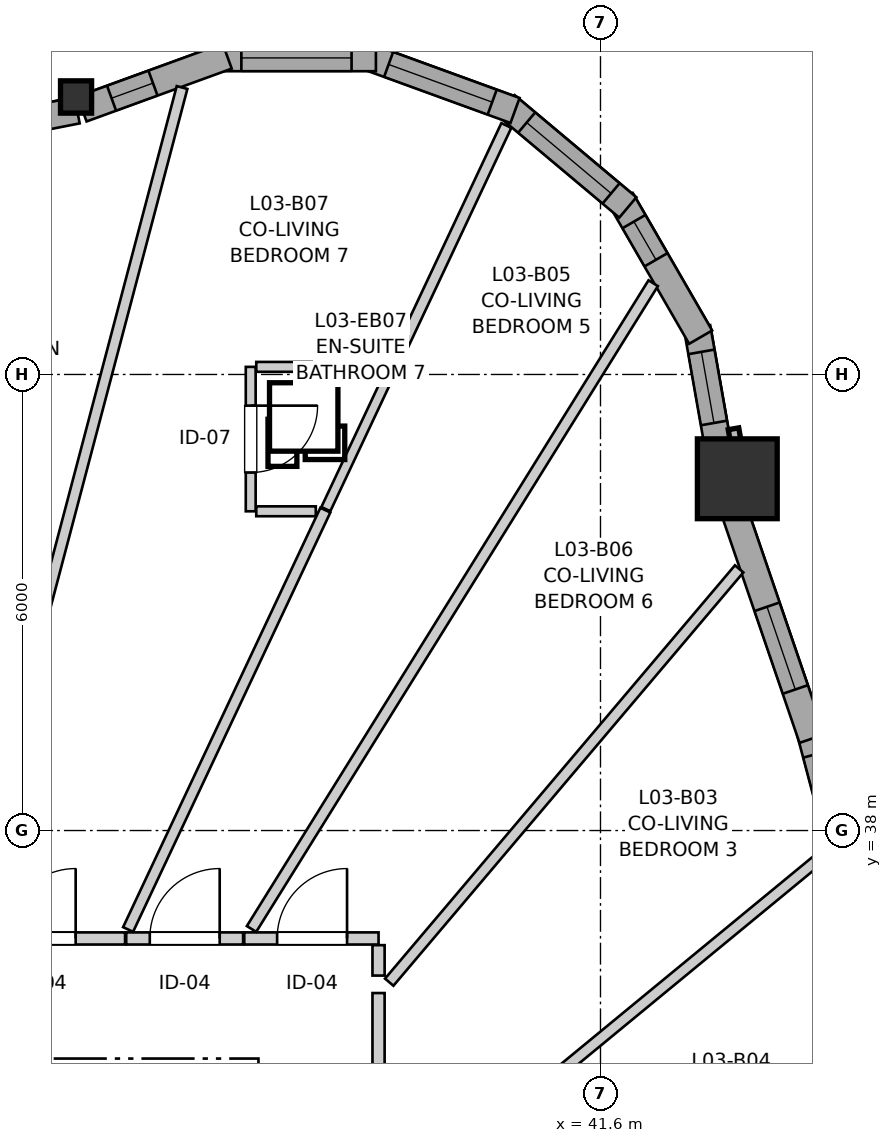
"""IFC4 building model, lengths in metres.
Left out: names, types, materials, properties, quantities, classifications, styles, units other than length and angle.
Written with IfcOpenShell. Run it as: python <this file> out.ifc"""

import sys

from ifc_helpers import new_model, si_unit, direction, frame, frame_2d, origin, origin_2d, place, context, subcontext, project, spatial, rectangle, i_section, extrude, source, transform, mapped, element, fill, save


model = new_model("IFC4")
c1 = context("Model", 3, precision=1e-05, world=origin(), true_north=direction((0.0, 1.0)))
c2 = subcontext(c1, "Body", "Model", "MODEL_VIEW")
j1 = project(units=[si_unit("LENGTHUNIT", "METRE"), si_unit("PLANEANGLEUNIT", "RADIAN")], contexts=[c1])
p1 = place(None, origin())
s1 = spatial("IfcSite", under=j1, at=p1, CompositionType="ELEMENT")
p2 = place(p1, origin())
s2 = spatial("IfcBuilding", under=s1, at=p2, CompositionType="ELEMENT")
p3 = place(p2, frame((0.0, 0.0, 14.2)))
s3 = spatial("IfcBuildingStorey", under=s2, at=p3, CompositionType="ELEMENT", Elevation=14.2)
m1 = source(origin(), c2, "Body", "SweptSolid", [
    extrude(rectangle(XDim=1.05, YDim=1.05, at=origin_2d()), origin(), (0.0, 0.0, 1.0), 2.94),
])
p4 = place(p3, frame((43.4, 42.628, 0.0), z_axis=(0.0, 0.0, 1.0), x_axis=(1.0, 0.0, 0.0)))
e1 = element("IfcColumn", 1, at=p4, inside=s3, PredefinedType="COLUMN", context=c2, shape_type="MappedRepresentation", body=[
    mapped(m1, transform((0.0, 0.0, 0.0), x_axis=(1.0, 0.0, 0.0), y_axis=(0.0, 1.0, 0.0), z_axis=(0.0, 0.0, 1.0), scale=1.0)),
])
m2 = source(origin(), c2, "Body", "SweptSolid", [
    extrude(i_section(OverallWidth=0.409, OverallDepth=0.425, WebThickness=0.03, FlangeThickness=0.048, FilletRadius=0.015, at=origin_2d()), origin(), (0.0, 0.0, 1.0), 2.94),
])
p5 = place(p3, frame((34.7, 47.651, 0.0), z_axis=(0.0, 0.0, 1.0), x_axis=(1.0, 0.0, 0.0)))
e2 = element("IfcColumn", 2, at=p5, inside=s3, PredefinedType="PILASTER", context=c2, shape_type="MappedRepresentation", body=[
    mapped(m2, transform((0.0, 0.0, 0.0), x_axis=(1.0, 0.0, 0.0), y_axis=(0.0, 1.0, 0.0), z_axis=(0.0, 0.0, 1.0), scale=1.0)),
])
p6 = place(p3, frame((45.248, 35.951, 0.0), z_axis=(0.0, 0.0, 1.0), x_axis=(-0.25703883136, 0.966401075731, 0.0)))
e3 = element("IfcWall", 3, at=p6, inside=s3, PredefinedType="SOLIDWALL", context=c2, shape_type="SweptSolid", body=[
    extrude(rectangle(XDim=3.459, YDim=0.35, at=frame_2d((1.729, 0.0))), origin(), (0.0, 0.0, 1.0), 2.42),
])
p7 = place(p6, frame((0.329, 0.0, 0.82)))
e4 = element("IfcOpeningElement", 4, at=p7, cuts=e3, PredefinedType="OPENING", context=c2, shape_type="SweptSolid", body=[
    extrude(rectangle(XDim=1.45, YDim=1.25, at=frame_2d((0.725, 0.625))), frame((0.0, 0.185, 0.0), z_axis=(0.0, -1.0, 0.0), x_axis=(1.0, 0.0, 0.0)), (0.0, 0.0, 1.0), 0.37),
])
p8 = place(p6, frame((2.109, 0.0, 0.82)))
e5 = element("IfcOpeningElement", 5, at=p8, cuts=e3, PredefinedType="OPENING", context=c2, shape_type="SweptSolid", body=[
    extrude(rectangle(XDim=1.05, YDim=1.45, at=frame_2d((0.525, 0.725))), frame((0.0, 0.185, 0.0), z_axis=(0.0, -1.0, 0.0), x_axis=(1.0, 0.0, 0.0)), (0.0, 0.0, 1.0), 0.37),
])
p9 = place(p3, frame((44.384, 39.21, 0.0), z_axis=(0.0, 0.0, 1.0), x_axis=(-0.323604561993, 0.946192415663, 0.0)))
e6 = element("IfcWall", 6, at=p9, inside=s3, PredefinedType="SOLIDWALL", context=c2, shape_type="SweptSolid", body=[
    extrude(rectangle(XDim=3.252, YDim=0.35, at=frame_2d((1.626, 0.0))), origin(), (0.0, 0.0, 1.0), 2.42),
])
p10 = place(p9, frame((0.683, 0.0, 0.82)))
e7 = element("IfcOpeningElement", 7, at=p10, cuts=e6, PredefinedType="OPENING", context=c2, shape_type="SweptSolid", body=[
    extrude(rectangle(XDim=1.15, YDim=1.2, at=frame_2d((0.575, 0.6))), frame((0.0, 0.185, 0.0), z_axis=(0.0, -1.0, 0.0), x_axis=(1.0, 0.0, 0.0)), (0.0, 0.0, 1.0), 0.37),
])
p11 = place(p3, frame((43.176, 42.893, 0.0), z_axis=(0.0, 0.0, 1.0), x_axis=(-0.173610462023, 0.984814402553, 0.0)))
e8 = element("IfcWall", 8, at=p11, inside=s3, PredefinedType="SOLIDWALL", context=c2, shape_type="SweptSolid", body=[
    extrude(rectangle(XDim=1.752, YDim=0.35, at=frame_2d((0.876, 0.0))), origin(), (0.0, 0.0, 1.0), 2.42),
])
p12 = place(p11, frame((0.476, 0.0, 0.82)))
e9 = element("IfcOpeningElement", 9, at=p12, cuts=e8, PredefinedType="OPENING", context=c2, shape_type="SweptSolid", body=[
    extrude(rectangle(XDim=0.95, YDim=1.35, at=frame_2d((0.475, 0.675))), frame((0.0, 0.185, 0.0), z_axis=(0.0, -1.0, 0.0), x_axis=(1.0, 0.0, 0.0)), (0.0, 0.0, 1.0), 0.37),
])
p13 = place(p3, frame((42.917, 44.491, 0.0), z_axis=(0.0, 0.0, 1.0), x_axis=(-0.49990781971, 0.866078617559, 0.0)))
e10 = element("IfcWall", 10, at=p13, inside=s3, PredefinedType="SOLIDWALL", context=c2, shape_type="SweptSolid", body=[
    extrude(rectangle(XDim=2.09, YDim=0.35, at=frame_2d((1.045, 0.0))), origin(), (0.0, 0.0, 1.0), 2.42),
])
p14 = place(p13, frame((1.175, 0.0, 0.82)))
e11 = element("IfcOpeningElement", 11, at=p14, cuts=e10, PredefinedType="OPENING", context=c2, shape_type="SweptSolid", body=[
    extrude(rectangle(XDim=0.58, YDim=1.35, at=frame_2d((0.29, 0.675))), frame((0.0, 0.185, 0.0), z_axis=(0.0, -1.0, 0.0), x_axis=(1.0, 0.0, 0.0)), (0.0, 0.0, 1.0), 0.37),
])
p15 = place(p3, frame((41.96, 46.198, 0.0), z_axis=(0.0, 0.0, 1.0), x_axis=(-0.766082082368, 0.642742750308, 0.0)))
e12 = element("IfcWall", 12, at=p15, inside=s3, PredefinedType="SOLIDWALL", context=c2, shape_type="SweptSolid", body=[
    extrude(rectangle(XDim=2.09, YDim=0.35, at=frame_2d((1.045, 0.0))), origin(), (0.0, 0.0, 1.0), 2.42),
])
p16 = place(p15, frame((0.287, 0.0, 0.82)))
e13 = element("IfcOpeningElement", 13, at=p16, cuts=e12, PredefinedType="OPENING", context=c2, shape_type="SweptSolid", body=[
    extrude(rectangle(XDim=1.45, YDim=1.25, at=frame_2d((0.725, 0.625))), frame((0.0, 0.185, 0.0), z_axis=(0.0, -1.0, 0.0), x_axis=(1.0, 0.0, 0.0)), (0.0, 0.0, 1.0), 0.37),
])
p17 = place(p3, frame((40.476, 47.473, 0.0), z_axis=(0.0, 0.0, 1.0), x_axis=(-0.939660353162, 0.342108784886, 0.0)))
e14 = element("IfcWall", 14, at=p17, inside=s3, PredefinedType="SOLIDWALL", context=c2, shape_type="SweptSolid", body=[
    extrude(rectangle(XDim=2.09, YDim=0.35, at=frame_2d((1.045, 0.0))), origin(), (0.0, 0.0, 1.0), 2.42),
])
p18 = place(p17, frame((0.32, 0.0, 0.82)))
e15 = element("IfcOpeningElement", 15, at=p18, cuts=e14, PredefinedType="OPENING", context=c2, shape_type="SweptSolid", body=[
    extrude(rectangle(XDim=1.45, YDim=1.25, at=frame_2d((0.725, 0.625))), frame((0.0, 0.185, 0.0), z_axis=(0.0, -1.0, 0.0), x_axis=(1.0, 0.0, 0.0)), (0.0, 0.0, 1.0), 0.37),
])
p19 = place(p3, frame((38.645, 48.165, 0.0), z_axis=(0.0, 0.0, 1.0), x_axis=(-1.0, 0.0, 0.0)))
e16 = element("IfcWall", 16, at=p19, inside=s3, PredefinedType="SOLIDWALL", context=c2, shape_type="SweptSolid", body=[
    extrude(rectangle(XDim=2.091, YDim=0.35, at=frame_2d((1.045, 0.0))), origin(), (0.0, 0.0, 1.0), 2.42),
])
p20 = place(p19, frame((0.32, 0.0, 0.82)))
e17 = element("IfcOpeningElement", 17, at=p20, cuts=e16, PredefinedType="OPENING", context=c2, shape_type="SweptSolid", body=[
    extrude(rectangle(XDim=1.45, YDim=1.25, at=frame_2d((0.725, 0.625))), frame((0.0, 0.185, 0.0), z_axis=(0.0, -1.0, 0.0), x_axis=(1.0, 0.0, 0.0)), (0.0, 0.0, 1.0), 0.37),
])
p21 = place(p3, frame((36.688, 48.188, 0.0), z_axis=(0.0, 0.0, 1.0), x_axis=(-0.939653047052, -0.342128851701, 0.0)))
e18 = element("IfcWall", 18, at=p21, inside=s3, PredefinedType="SOLIDWALL", context=c2, shape_type="SweptSolid", body=[
    extrude(rectangle(XDim=2.032, YDim=0.35, at=frame_2d((1.016, 0.0))), origin(), (0.0, 0.0, 1.0), 2.42),
])
p22 = place(p21, frame((1.039, 0.0, 0.82)))
e19 = element("IfcOpeningElement", 19, at=p22, cuts=e18, PredefinedType="OPENING", context=c2, shape_type="SweptSolid", body=[
    extrude(rectangle(XDim=0.58, YDim=1.35, at=frame_2d((0.29, 0.675))), frame((0.0, 0.185, 0.0), z_axis=(0.0, -1.0, 0.0), x_axis=(1.0, 0.0, 0.0)), (0.0, 0.0, 1.0), 0.37),
])
p23 = place(p3, frame((34.714, 47.475, 0.0), z_axis=(0.0, 0.0, 1.0), x_axis=(-0.981221268425, -0.192885516282, 0.0)))
e20 = element("IfcWall", 20, at=p23, inside=s3, PredefinedType="SOLIDWALL", context=c2, shape_type="SweptSolid", body=[
    extrude(rectangle(XDim=3.533, YDim=0.35, at=frame_2d((1.766, 0.0))), origin(), (0.0, 0.0, 1.0), 2.42),
])
p24 = place(p23, frame((0.706, 0.0, 0.82)))
e21 = element("IfcOpeningElement", 21, at=p24, cuts=e20, PredefinedType="OPENING", context=c2, shape_type="SweptSolid", body=[
    extrude(rectangle(XDim=2.1, YDim=1.4, at=frame_2d((1.05, 0.7))), frame((0.0, 0.185, 0.0), z_axis=(0.0, -1.0, 0.0), x_axis=(1.0, 0.0, 0.0)), (0.0, 0.0, 1.0), 0.37),
])
p25 = place(p3, frame((38.68, 35.862, 0.0), z_axis=(0.0, 0.0, 1.0), x_axis=(0.0, -1.0, 0.0)))
e22 = element("IfcWall", 22, at=p25, inside=s3, PredefinedType="PARTITIONING", context=c2, shape_type="SweptSolid", body=[
    extrude(rectangle(XDim=3.024, YDim=0.16, at=frame_2d((1.512, 0.0))), origin(), (0.0, 0.0, 1.0), 2.94),
])
p26 = place(p25, frame((1.053, 0.0, 0.0)))
e23 = element("IfcOpeningElement", 23, at=p26, cuts=e22, PredefinedType="OPENING", context=c2, shape_type="SweptSolid", body=[
    extrude(rectangle(XDim=0.92, YDim=2.1, at=frame_2d((0.46, 1.05))), frame((0.0, 0.09, 0.0), z_axis=(0.0, -1.0, 0.0), x_axis=(1.0, 0.0, 0.0)), (0.0, 0.0, 1.0), 0.18),
])
p27 = place(p3, frame((33.172, 36.58, 0.0), z_axis=(0.0, 0.0, 1.0), x_axis=(1.0, 0.0, 0.0)))
e24 = element("IfcWall", 24, at=p27, inside=s3, PredefinedType="PARTITIONING", context=c2, shape_type="SweptSolid", body=[
    extrude(rectangle(XDim=2.173, YDim=0.16, at=frame_2d((1.086, 0.0))), origin(), (0.0, 0.0, 1.0), 2.94),
])
p28 = place(p27, frame((0.603, 0.0, 0.0)))
e25 = element("IfcOpeningElement", 25, at=p28, cuts=e24, PredefinedType="OPENING", context=c2, shape_type="SweptSolid", body=[
    extrude(rectangle(XDim=0.92, YDim=2.1, at=frame_2d((0.46, 1.05))), frame((0.0, 0.09, 0.0), z_axis=(0.0, -1.0, 0.0), x_axis=(1.0, 0.0, 0.0)), (0.0, 0.0, 1.0), 0.18),
])
p29 = place(p3, frame((36.998, 44.1, 0.0), z_axis=(0.0, 0.0, 1.0), x_axis=(0.0, -1.0, 0.0)))
e26 = element("IfcWall", 26, at=p29, inside=s3, PredefinedType="PARTITIONING", context=c2, shape_type="SweptSolid", body=[
    extrude(rectangle(XDim=1.9, YDim=0.13, at=frame_2d((0.95, 0.0))), origin(), (0.0, 0.0, 1.0), 2.94),
])
p30 = place(p29, frame((0.51, 0.0, 0.0)))
e27 = element("IfcOpeningElement", 27, at=p30, cuts=e26, PredefinedType="OPENING", context=c2, shape_type="SweptSolid", body=[
    extrude(rectangle(XDim=0.88, YDim=2.05, at=frame_2d((0.44, 1.025))), frame((0.0, 0.075, 0.0), z_axis=(0.0, -1.0, 0.0), x_axis=(1.0, 0.0, 0.0)), (0.0, 0.0, 1.0), 0.15),
])
p31 = place(p3, frame((36.913, 36.58, 0.0), z_axis=(0.0, 0.0, 1.0), x_axis=(1.0, 0.0, 0.0)))
e28 = element("IfcWall", 28, at=p31, inside=s3, PredefinedType="PARTITIONING", context=c2, shape_type="SweptSolid", body=[
    extrude(rectangle(XDim=1.767, YDim=0.16, at=frame_2d((0.883, 0.0))), origin(), (0.0, 0.0, 1.0), 2.94),
])
p32 = place(p31, frame((0.433, 0.0, 0.0)))
e29 = element("IfcOpeningElement", 29, at=p32, cuts=e28, PredefinedType="OPENING", context=c2, shape_type="SweptSolid", body=[
    extrude(rectangle(XDim=0.92, YDim=2.1, at=frame_2d((0.46, 1.05))), frame((0.0, 0.09, 0.0), z_axis=(0.0, -1.0, 0.0), x_axis=(1.0, 0.0, 0.0)), (0.0, 0.0, 1.0), 0.18),
])
p33 = place(p3, frame((35.36, 36.58, 0.0), z_axis=(0.0, 0.0, 1.0), x_axis=(1.0, 0.0, 0.0)))
e30 = element("IfcWall", 30, at=p33, inside=s3, PredefinedType="PARTITIONING", context=c2, shape_type="SweptSolid", body=[
    extrude(rectangle(XDim=1.538, YDim=0.16, at=frame_2d((0.769, 0.0))), origin(), (0.0, 0.0, 1.0), 2.94),
])
p34 = place(p33, frame((0.31, 0.0, 0.0)))
e31 = element("IfcOpeningElement", 31, at=p34, cuts=e30, PredefinedType="OPENING", context=c2, shape_type="SweptSolid", body=[
    extrude(rectangle(XDim=0.92, YDim=2.1, at=frame_2d((0.46, 1.05))), frame((0.0, 0.09, 0.0), z_axis=(0.0, -1.0, 0.0), x_axis=(1.0, 0.0, 0.0)), (0.0, 0.0, 1.0), 0.18),
])
p35 = place(p3, frame((33.169, 36.686, 0.0), z_axis=(0.0, 0.0, 1.0), x_axis=(0.255112522394, 0.966911371801, 0.0)))
e32 = element("IfcWall", 32, at=p35, inside=s3, PredefinedType="PARTITIONING", context=c2, shape_type="SweptSolid", body=[
    extrude(rectangle(XDim=11.469, YDim=0.145, at=frame_2d((5.734, 0.0))), origin(), (0.0, 0.0, 1.0), 2.94),
])
p36 = place(p3, frame((37.009, 36.705, 0.0), z_axis=(0.0, 0.0, 1.0), x_axis=(0.528183829193, 0.849130050451, 0.0)))
e33 = element("IfcWall", 33, at=p36, inside=s3, PredefinedType="PARTITIONING", context=c2, shape_type="SweptSolid", body=[
    extrude(rectangle(XDim=10.005, YDim=0.145, at=frame_2d((5.003, 0.0))), origin(), (0.0, 0.0, 1.0), 2.94),
])
p37 = place(p3, frame((38.812, 32.967, 0.0), z_axis=(0.0, 0.0, 1.0), x_axis=(0.772048037558, 0.635564180633, 0.0)))
e34 = element("IfcWall", 34, at=p37, inside=s3, PredefinedType="PARTITIONING", context=c2, shape_type="SweptSolid", body=[
    extrude(rectangle(XDim=7.477, YDim=0.145, at=frame_2d((3.739, 0.0))), origin(), (0.0, 0.0, 1.0), 2.94),
])
p38 = place(p3, frame((38.821, 36.005, 0.0), z_axis=(0.0, 0.0, 1.0), x_axis=(0.646174151972, 0.76318999294, 0.0)))
e35 = element("IfcWall", 35, at=p38, inside=s3, PredefinedType="PARTITIONING", context=c2, shape_type="SweptSolid", body=[
    extrude(rectangle(XDim=7.125, YDim=0.145, at=frame_2d((3.562, 0.0))), origin(), (0.0, 0.0, 1.0), 2.94),
])
p39 = place(p3, frame((35.385, 36.698, 0.0), z_axis=(0.0, 0.0, 1.0), x_axis=(0.425687116038, 0.904870421242, 0.0)))
e36 = element("IfcWall", 36, at=p39, inside=s3, PredefinedType="PARTITIONING", context=c2, shape_type="SweptSolid", body=[
    extrude(rectangle(XDim=6.097, YDim=0.145, at=frame_2d((3.049, 0.0))), origin(), (0.0, 0.0, 1.0), 2.94),
])
p40 = place(p3, frame((38.783, 43.921, 0.0), z_axis=(0.0, 0.0, 1.0), x_axis=(0.425698730146, 0.904864957412, 0.0)))
e37 = element("IfcWall", 37, at=p40, inside=s3, PredefinedType="PARTITIONING", context=c2, shape_type="SweptSolid", body=[
    extrude(rectangle(XDim=3.708, YDim=0.145, at=frame_2d((1.854, 0.0))), origin(), (0.0, 0.0, 1.0), 2.94),
])
p41 = place(p3, frame((37.987, 42.229, 0.0), z_axis=(0.0, 0.0, 1.0), x_axis=(0.425771690569, 0.904830629184, 0.0)))
e38 = element("IfcWall", 38, at=p41, inside=s3, PredefinedType="PARTITIONING", context=c2, shape_type="SweptSolid", body=[
    extrude(rectangle(XDim=1.855, YDim=0.13, at=frame_2d((0.928, 0.0))), origin(), (0.0, 0.0, 1.0), 2.94),
])
p42 = place(p3, frame((37.071, 44.1, 0.0), z_axis=(0.0, 0.0, 1.0), x_axis=(1.0, 0.0, 0.0)))
e39 = element("IfcWall", 39, at=p42, inside=s3, PredefinedType="PARTITIONING", context=c2, shape_type="SweptSolid", body=[
    extrude(rectangle(XDim=1.608, YDim=0.13, at=frame_2d((0.804, 0.0))), origin(), (0.0, 0.0, 1.0), 2.94),
])
p43 = place(p3, frame((37.071, 42.2, 0.0), z_axis=(0.0, 0.0, 1.0), x_axis=(1.0, 0.0, 0.0)))
e40 = element("IfcWall", 40, at=p43, inside=s3, PredefinedType="PARTITIONING", context=c2, shape_type="SweptSolid", body=[
    extrude(rectangle(XDim=0.783, YDim=0.13, at=frame_2d((0.392, 0.0))), origin(), (0.0, 0.0, 1.0), 2.94),
])
p44 = place(p3, frame((38.68, 36.092, 0.0), z_axis=(0.0, 0.0, 1.0), x_axis=(0.0, 1.0, 0.0)))
e41 = element("IfcWall", 41, at=p44, inside=s3, PredefinedType="PARTITIONING", context=c2, shape_type="SweptSolid", body=[
    extrude(rectangle(XDim=0.4, YDim=0.16, at=frame_2d((0.2, 0.0))), origin(), (0.0, 0.0, 1.0), 2.94),
])
m3 = source(origin(), c2, "Body", "SweptSolid", [
    extrude(rectangle(XDim=1.15, YDim=1.2, at=frame_2d((0.575, 0.6))), frame((0.0, 0.03, 0.0), z_axis=(0.0, -1.0, 0.0), x_axis=(1.0, 0.0, 0.0)), (0.0, 0.0, 1.0), 0.06),
])
p45 = place(p10, origin())
e42 = element("IfcWindow", 42, at=p45, inside=s3, PartitioningType="SINGLE_PANEL", PredefinedType="WINDOW", context=c2, shape_type="MappedRepresentation", body=[
    mapped(m3, transform((0.0, 0.0, 0.0), x_axis=(1.0, 0.0, 0.0), y_axis=(0.0, 1.0, 0.0), z_axis=(0.0, 0.0, 1.0), scale=1.0)),
])
fill(e7, e42)
m4 = source(origin(), c2, "Body", "SweptSolid", [
    extrude(rectangle(XDim=0.95, YDim=1.35, at=frame_2d((0.475, 0.675))), frame((0.0, 0.03, 0.0), z_axis=(0.0, -1.0, 0.0), x_axis=(1.0, 0.0, 0.0)), (0.0, 0.0, 1.0), 0.06),
])
p46 = place(p12, origin())
e43 = element("IfcWindow", 43, at=p46, inside=s3, PartitioningType="SINGLE_PANEL", PredefinedType="WINDOW", context=c2, shape_type="MappedRepresentation", body=[
    mapped(m4, transform((0.0, 0.0, 0.0), x_axis=(1.0, 0.0, 0.0), y_axis=(0.0, 1.0, 0.0), z_axis=(0.0, 0.0, 1.0), scale=1.0)),
])
fill(e9, e43)
m5 = source(origin(), c2, "Body", "SweptSolid", [
    extrude(rectangle(XDim=0.58, YDim=1.35, at=frame_2d((0.29, 0.675))), frame((0.0, 0.03, 0.0), z_axis=(0.0, -1.0, 0.0), x_axis=(1.0, 0.0, 0.0)), (0.0, 0.0, 1.0), 0.06),
])
p47 = place(p14, origin())
e44 = element("IfcWindow", 44, at=p47, inside=s3, PartitioningType="SINGLE_PANEL", PredefinedType="WINDOW", context=c2, shape_type="MappedRepresentation", body=[
    mapped(m5, transform((0.0, 0.0, 0.0), x_axis=(1.0, 0.0, 0.0), y_axis=(0.0, 1.0, 0.0), z_axis=(0.0, 0.0, 1.0), scale=1.0)),
])
fill(e11, e44)
m6 = source(origin(), c2, "Body", "SweptSolid", [
    extrude(rectangle(XDim=1.45, YDim=1.25, at=frame_2d((0.725, 0.625))), frame((0.0, 0.03, 0.0), z_axis=(0.0, -1.0, 0.0), x_axis=(1.0, 0.0, 0.0)), (0.0, 0.0, 1.0), 0.06),
])
p48 = place(p16, origin())
e45 = element("IfcWindow", 45, at=p48, inside=s3, PartitioningType="SINGLE_PANEL", PredefinedType="WINDOW", context=c2, shape_type="MappedRepresentation", body=[
    mapped(m6, transform((0.0, 0.0, 0.0), x_axis=(1.0, 0.0, 0.0), y_axis=(0.0, 1.0, 0.0), z_axis=(0.0, 0.0, 1.0), scale=1.0)),
])
fill(e13, e45)
p49 = place(p18, origin())
e46 = element("IfcWindow", 46, at=p49, inside=s3, PartitioningType="SINGLE_PANEL", PredefinedType="WINDOW", context=c2, shape_type="MappedRepresentation", body=[
    mapped(m6, transform((0.0, 0.0, 0.0), x_axis=(1.0, 0.0, 0.0), y_axis=(0.0, 1.0, 0.0), z_axis=(0.0, 0.0, 1.0), scale=1.0)),
])
fill(e15, e46)
p50 = place(p20, origin())
e47 = element("IfcWindow", 47, at=p50, inside=s3, PartitioningType="SINGLE_PANEL", PredefinedType="WINDOW", context=c2, shape_type="MappedRepresentation", body=[
    mapped(m6, transform((0.0, 0.0, 0.0), x_axis=(1.0, 0.0, 0.0), y_axis=(0.0, 1.0, 0.0), z_axis=(0.0, 0.0, 1.0), scale=1.0)),
])
fill(e17, e47)
p51 = place(p22, origin())
e48 = element("IfcWindow", 48, at=p51, inside=s3, PartitioningType="SINGLE_PANEL", PredefinedType="WINDOW", context=c2, shape_type="MappedRepresentation", body=[
    mapped(m5, transform((0.0, 0.0, 0.0), x_axis=(1.0, 0.0, 0.0), y_axis=(0.0, 1.0, 0.0), z_axis=(0.0, 0.0, 1.0), scale=1.0)),
])
fill(e19, e48)
m7 = source(origin(), c2, "Body", "SweptSolid", [
    extrude(rectangle(XDim=0.92, YDim=2.1, at=frame_2d((0.46, 1.05))), frame((0.0, 0.025, 0.0), z_axis=(0.0, -1.0, 0.0), x_axis=(1.0, 0.0, 0.0)), (0.0, 0.0, 1.0), 0.05),
])
p52 = place(p28, origin())
e49 = element("IfcDoor", 49, at=p52, inside=s3, OperationType="SINGLE_SWING_RIGHT", PredefinedType="DOOR", context=c2, shape_type="MappedRepresentation", body=[
    mapped(m7, transform((0.0, 0.0, 0.0), x_axis=(1.0, 0.0, 0.0), y_axis=(0.0, 1.0, 0.0), z_axis=(0.0, 0.0, 1.0), scale=1.0)),
])
fill(e25, e49)
m8 = source(origin(), c2, "Body", "SweptSolid", [
    extrude(rectangle(XDim=0.88, YDim=2.05, at=frame_2d((0.44, 1.025))), frame((0.0, 0.025, 0.0), z_axis=(0.0, -1.0, 0.0), x_axis=(1.0, 0.0, 0.0)), (0.0, 0.0, 1.0), 0.05),
])
p53 = place(p30, origin())
e50 = element("IfcDoor", 50, at=p53, inside=s3, OperationType="SINGLE_SWING_LEFT", PredefinedType="DOOR", context=c2, shape_type="MappedRepresentation", body=[
    mapped(m8, transform((0.0, 0.0, 0.0), x_axis=(1.0, 0.0, 0.0), y_axis=(0.0, 1.0, 0.0), z_axis=(0.0, 0.0, 1.0), scale=1.0)),
])
fill(e27, e50)
p54 = place(p32, origin())
e51 = element("IfcDoor", 51, at=p54, inside=s3, OperationType="SINGLE_SWING_RIGHT", PredefinedType="DOOR", context=c2, shape_type="MappedRepresentation", body=[
    mapped(m7, transform((0.0, 0.0, 0.0), x_axis=(1.0, 0.0, 0.0), y_axis=(0.0, 1.0, 0.0), z_axis=(0.0, 0.0, 1.0), scale=1.0)),
])
fill(e29, e51)
p55 = place(p34, origin())
e52 = element("IfcDoor", 52, at=p55, inside=s3, OperationType="SINGLE_SWING_RIGHT", PredefinedType="DOOR", context=c2, shape_type="MappedRepresentation", body=[
    mapped(m7, transform((0.0, 0.0, 0.0), x_axis=(1.0, 0.0, 0.0), y_axis=(0.0, 1.0, 0.0), z_axis=(0.0, 0.0, 1.0), scale=1.0)),
])
fill(e31, e52)
save(model, sys.argv[1])
